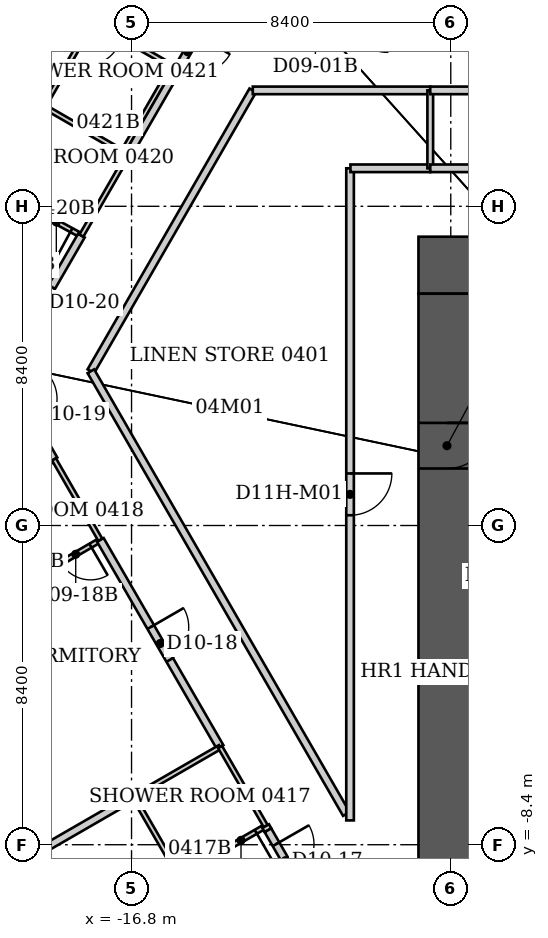
"""IFC4 building model, lengths in metres.
Left out: names, types, materials, properties, quantities, classifications, styles, units other than length and angle.
Written with IfcOpenShell. Run it as: python <this file> out.ifc"""

import sys

from ifc_helpers import new_model, si_unit, direction, frame, frame_2d, origin, place, context, subcontext, project, spatial, rectangle, extrude, element, fill, save


model = new_model("IFC4")
c1 = context("Model", 3, precision=1e-05, world=origin(), true_north=direction((0.0, 1.0)))
c2 = subcontext(c1, "Body", "Model", "MODEL_VIEW")
j1 = project(units=[si_unit("LENGTHUNIT", "METRE"), si_unit("PLANEANGLEUNIT", "RADIAN")], contexts=[c1])
p1 = place(None, origin())
s1 = spatial("IfcSite", under=j1, at=p1, CompositionType="ELEMENT")
p2 = place(p1, origin())
s2 = spatial("IfcBuilding", under=s1, at=p2, CompositionType="ELEMENT")
p3 = place(p2, frame((0.0, 0.0, 23.0)))
s3 = spatial("IfcBuildingStorey", under=s2, at=p3, CompositionType="ELEMENT", Elevation=23.0)
p4 = place(p3, frame((-9.25, 6.85, 0.0), z_axis=(0.0, 0.0, 1.0), x_axis=(1.0, 0.0, 0.0)))
e1 = element("IfcWall", 1, at=p4, inside=s3, PredefinedType="SHEAR", context=c2, shape_type="SweptSolid", body=[
    extrude(rectangle(XDim=18.5, YDim=1.5, at=frame_2d((9.25, 0.0))), origin(), (0.0, 0.0, 1.0), 3.8),
])
p5 = place(p3, frame((-8.5, -9.2, 0.0), z_axis=(0.0, 0.0, 1.0), x_axis=(0.0, 1.0, 0.0)))
e2 = element("IfcWall", 2, at=p5, inside=s3, PredefinedType="SHEAR", context=c2, shape_type="SweptSolid", body=[
    extrude(rectangle(XDim=15.3, YDim=1.5, at=frame_2d((7.65, 0.0))), origin(), (0.0, 0.0, 1.0), 3.8),
])
p6 = place(p5, frame((10.7, 0.0, 0.0)))
e3 = element("IfcOpeningElement", 3, at=p6, cuts=e2, PredefinedType="OPENING", context=c2, shape_type="SweptSolid", body=[
    extrude(rectangle(XDim=1.2, YDim=2.2, at=frame_2d((0.6, 1.1))), frame((0.0, 0.75, 0.0), z_axis=(0.0, -1.0, 0.0), x_axis=(1.0, 0.0, 0.0)), (0.0, 0.0, 1.0), 1.5),
])
p7 = place(p3, frame((-21.726, -10.02, 0.0), z_axis=(0.0, 0.0, 1.0), x_axis=(0.865919350456, 0.50018364478, 0.0)))
e4 = element("IfcWall", 4, at=p7, inside=s3, PredefinedType="PARTITIONING", context=c2, shape_type="SweptSolid", body=[
    extrude(rectangle(XDim=5.758, YDim=0.2, at=frame_2d((2.879, 0.0))), origin(), (0.0, 0.0, 1.0), 3.023),
])
p8 = place(p3, frame((-20.53, 0.77, 0.0), z_axis=(0.0, 0.0, 1.0), x_axis=(0.867293167797, 0.497797711016, 0.0)))
e5 = element("IfcWall", 5, at=p8, inside=s3, PredefinedType="PARTITIONING", context=c2, shape_type="SweptSolid", body=[
    extrude(rectangle(XDim=1.948, YDim=0.12, at=frame_2d((0.974, 0.0))), origin(), (0.0, 0.0, 1.0), 3.64),
])
p9 = place(p3, frame((-20.41, 8.87, 0.0), z_axis=(0.0, 0.0, 1.0), x_axis=(0.879324680711, -0.476222748189, 0.0)))
e6 = element("IfcWall", 6, at=p9, inside=s3, PredefinedType="PARTITIONING", context=c2, shape_type="SweptSolid", body=[
    extrude(rectangle(XDim=2.604, YDim=0.12, at=frame_2d((1.302, 0.0))), origin(), (0.0, 0.0, 1.0), 3.64),
])
p10 = place(p9, frame((1.404, 0.0, 0.0)))
e7 = element("IfcOpeningElement", 7, at=p10, cuts=e6, PredefinedType="OPENING", context=c2, shape_type="SweptSolid", body=[
    extrude(rectangle(XDim=0.9, YDim=2.03, at=frame_2d((0.45, 1.015))), frame((0.0, 0.06, 0.0), z_axis=(0.0, -1.0, 0.0), x_axis=(1.0, 0.0, 0.0)), (0.0, 0.0, 1.0), 0.12),
])
p11 = place(p3, frame((-20.18, 4.06, 0.0), z_axis=(0.0, 0.0, 1.0), x_axis=(0.500098439427, -0.865968562295, 0.0)))
e8 = element("IfcWall", 8, at=p11, inside=s3, PredefinedType="PARTITIONING", context=c2, shape_type="SweptSolid", body=[
    extrude(rectangle(XDim=2.679, YDim=0.2, at=frame_2d((1.34, 0.0))), origin(), (0.0, 0.0, 1.0), 3.64),
])
p12 = place(p11, frame((0.84, 0.0, 0.0)))
e9 = element("IfcOpeningElement", 9, at=p12, cuts=e8, PredefinedType="OPENING", context=c2, shape_type="SweptSolid", body=[
    extrude(rectangle(XDim=1.0, YDim=2.13, at=frame_2d((0.5, 1.065))), frame((0.0, 0.1, 0.0), z_axis=(0.0, -1.0, 0.0), x_axis=(1.0, 0.0, 0.0)), (0.0, 0.0, 1.0), 0.2),
])
p13 = place(p3, frame((-20.18, 4.06, 0.0), z_axis=(0.0, 0.0, 1.0), x_axis=(0.499891670567, 0.866087938779, 0.0)))
e10 = element("IfcWall", 10, at=p13, inside=s3, PredefinedType="PARTITIONING", context=c2, shape_type="SweptSolid", body=[
    extrude(rectangle(XDim=4.122, YDim=0.2, at=frame_2d((2.061, 0.0))), origin(), (0.0, 0.0, 1.0), 3.64),
])
p14 = place(p13, frame((1.561, 0.0, 0.0)))
e11 = element("IfcOpeningElement", 11, at=p14, cuts=e10, PredefinedType="OPENING", context=c2, shape_type="SweptSolid", body=[
    extrude(rectangle(XDim=1.0, YDim=2.13, at=frame_2d((0.5, 1.065))), frame((0.0, 0.1, 0.0), z_axis=(0.0, -1.0, 0.0), x_axis=(1.0, 0.0, 0.0)), (0.0, 0.0, 1.0), 0.2),
])
p15 = place(p3, frame((-19.93, -1.72, 0.0), z_axis=(0.0, 0.0, 1.0), x_axis=(0.865006586495, 0.501760505939, 0.0)))
e12 = element("IfcWall", 12, at=p15, inside=s3, PredefinedType="PARTITIONING", context=c2, shape_type="SweptSolid", body=[
    extrude(rectangle(XDim=2.67, YDim=0.12, at=frame_2d((1.335, 0.0))), origin(), (0.0, 0.0, 1.0), 2.878),
])
p16 = place(p15, frame((1.47, 0.0, 0.0)))
e13 = element("IfcOpeningElement", 13, at=p16, cuts=e12, PredefinedType="OPENING", context=c2, shape_type="SweptSolid", body=[
    extrude(rectangle(XDim=0.9, YDim=2.03, at=frame_2d((0.45, 1.015))), frame((0.0, 0.06, 0.0), z_axis=(0.0, -1.0, 0.0), x_axis=(1.0, 0.0, 0.0)), (0.0, 0.0, 1.0), 0.12),
])
p17 = place(p3, frame((-19.11, 11.03, 0.0), z_axis=(0.0, 0.0, 1.0), x_axis=(0.866202511239, -0.499693115345, 0.0)))
e14 = element("IfcWall", 14, at=p17, inside=s3, PredefinedType="PARTITIONING", context=c2, shape_type="SweptSolid", body=[
    extrude(rectangle(XDim=2.401, YDim=0.12, at=frame_2d((1.201, 0.0))), origin(), (0.0, 0.0, 1.0), 2.86),
])
p18 = place(p3, frame((-18.84, 1.74, 0.0), z_axis=(0.0, 0.0, 1.0), x_axis=(0.498791783817, -0.866721844883, 0.0)))
e15 = element("IfcWall", 15, at=p18, inside=s3, PredefinedType="PARTITIONING", context=c2, shape_type="SweptSolid", body=[
    extrude(rectangle(XDim=2.446, YDim=0.12, at=frame_2d((1.223, 0.0))), origin(), (0.0, 0.0, 1.0), 3.64),
])
p19 = place(p3, frame((-18.12, 7.63, 0.0), z_axis=(0.0, 0.0, 1.0), x_axis=(0.499957770222, 0.866049783786, 0.0)))
e16 = element("IfcWall", 16, at=p19, inside=s3, PredefinedType="PARTITIONING", context=c2, shape_type="SweptSolid", body=[
    extrude(rectangle(XDim=2.455, YDim=0.12, at=frame_2d((1.228, 0.0))), origin(), (0.0, 0.0, 1.0), 3.64),
])
p20 = place(p3, frame((-17.87, 4.06, 0.0), z_axis=(0.0, 0.0, 1.0), x_axis=(0.499424260127, 0.866357552282, 0.0)))
e17 = element("IfcWall", 17, at=p20, inside=s3, PredefinedType="PARTITIONING", context=c2, shape_type="SweptSolid", body=[
    extrude(rectangle(XDim=8.53, YDim=0.2, at=frame_2d((4.265, 0.0))), origin(), (0.0, 0.0, 1.0), 3.64),
])
p21 = place(p3, frame((-17.81, 13.28, 0.0), z_axis=(0.0, 0.0, 1.0), x_axis=(-0.500291685314, -0.865856933682, 0.0)))
e18 = element("IfcWall", 18, at=p21, inside=s3, PredefinedType="PARTITIONING", context=c2, shape_type="SweptSolid", body=[
    extrude(rectangle(XDim=2.599, YDim=0.12, at=frame_2d((1.299, 0.0))), origin(), (0.0, 0.0, 1.0), 3.64),
])
p22 = place(p21, frame((0.3, 0.0, 0.0)))
e19 = element("IfcOpeningElement", 19, at=p22, cuts=e18, PredefinedType="OPENING", context=c2, shape_type="SweptSolid", body=[
    extrude(rectangle(XDim=0.9, YDim=2.03, at=frame_2d((0.45, 1.015))), frame((0.0, 0.06, 0.0), z_axis=(0.0, -1.0, 0.0), x_axis=(1.0, 0.0, 0.0)), (0.0, 0.0, 1.0), 0.12),
])
p23 = place(p3, frame((-17.62, -0.38, 0.0), z_axis=(0.0, 0.0, 1.0), x_axis=(0.500413927211, -0.865786290867, 0.0)))
e20 = element("IfcWall", 20, at=p23, inside=s3, PredefinedType="PARTITIONING", context=c2, shape_type="SweptSolid", body=[
    extrude(rectangle(XDim=6.295, YDim=0.2, at=frame_2d((3.147, 0.0))), origin(), (0.0, 0.0, 1.0), 3.64),
])
p24 = place(p23, frame((2.647, 0.0, 0.0)))
e21 = element("IfcOpeningElement", 21, at=p24, cuts=e20, PredefinedType="OPENING", context=c2, shape_type="SweptSolid", body=[
    extrude(rectangle(XDim=1.0, YDim=2.13, at=frame_2d((0.5, 1.065))), frame((0.0, 0.1, 0.0), z_axis=(0.0, -1.0, 0.0), x_axis=(1.0, 0.0, 0.0)), (0.0, 0.0, 1.0), 0.2),
])
p25 = place(p3, frame((-17.03, 9.83, 0.0), z_axis=(0.0, 0.0, 1.0), x_axis=(0.880098986228, -0.47479024257, 0.0)))
e22 = element("IfcWall", 22, at=p25, inside=s3, PredefinedType="PARTITIONING", context=c2, shape_type="SweptSolid", body=[
    extrude(rectangle(XDim=0.147, YDim=0.12, at=frame_2d((0.074, 0.0))), origin(), (0.0, 0.0, 1.0), 3.64),
])
p26 = place(p3, frame((-17.03, 9.83, 0.0), z_axis=(0.0, 0.0, 1.0), x_axis=(0.500291685314, 0.865856933682, 0.0)))
e23 = element("IfcWall", 23, at=p26, inside=s3, PredefinedType="PARTITIONING", context=c2, shape_type="SweptSolid", body=[
    extrude(rectangle(XDim=2.599, YDim=0.12, at=frame_2d((1.299, 0.0))), origin(), (0.0, 0.0, 1.0), 3.64),
])
p27 = place(p3, frame((-16.892, 9.756, 0.0), z_axis=(0.0, 0.0, 1.0), x_axis=(0.499894213467, 0.866086471054, 0.0)))
e24 = element("IfcWall", 24, at=p27, inside=s3, PredefinedType="PARTITIONING", context=c2, shape_type="SweptSolid", body=[
    extrude(rectangle(XDim=4.266, YDim=0.2, at=frame_2d((2.133, 0.0))), origin(), (0.0, 0.0, 1.0), 3.64),
])
p28 = place(p27, frame((2.633, 0.0, 0.0)))
e25 = element("IfcOpeningElement", 25, at=p28, cuts=e24, PredefinedType="OPENING", context=c2, shape_type="SweptSolid", body=[
    extrude(rectangle(XDim=1.0, YDim=2.13, at=frame_2d((0.5, 1.065))), frame((0.0, 0.1, 0.0), z_axis=(0.0, -1.0, 0.0), x_axis=(1.0, 0.0, 0.0)), (0.0, 0.0, 1.0), 0.2),
])
p29 = place(p3, frame((-16.74, -7.14, 0.0), z_axis=(0.0, 0.0, 1.0), x_axis=(0.499693115345, -0.866202511239, 0.0)))
e26 = element("IfcWall", 26, at=p29, inside=s3, PredefinedType="PARTITIONING", context=c2, shape_type="SweptSolid", body=[
    extrude(rectangle(XDim=2.401, YDim=0.12, at=frame_2d((1.201, 0.0))), origin(), (0.0, 0.0, 1.0), 3.64),
])
p30 = place(p3, frame((-16.74, -7.14, 0.0), z_axis=(0.0, 0.0, 1.0), x_axis=(0.866154567199, 0.49977621564, 0.0)))
e27 = element("IfcWall", 27, at=p30, inside=s3, PredefinedType="PARTITIONING", context=c2, shape_type="SweptSolid", body=[
    extrude(rectangle(XDim=2.621, YDim=0.12, at=frame_2d((1.311, 0.0))), origin(), (0.0, 0.0, 1.0), 3.023),
])
p31 = place(p3, frame((-15.73, 12.08, 0.0), z_axis=(0.0, 0.0, 1.0), x_axis=(-0.866202511239, 0.499693115345, 0.0)))
e28 = element("IfcWall", 28, at=p31, inside=s3, PredefinedType="PARTITIONING", context=c2, shape_type="SweptSolid", body=[
    extrude(rectangle(XDim=2.401, YDim=0.12, at=frame_2d((1.201, 0.0))), origin(), (0.0, 0.0, 1.0), 3.64),
])
p32 = place(p3, frame((-15.54, -9.22, 0.0), z_axis=(0.0, 0.0, 1.0), x_axis=(0.866114241029, 0.499846097802, 0.0)))
e29 = element("IfcWall", 29, at=p32, inside=s3, PredefinedType="PARTITIONING", context=c2, shape_type="SweptSolid", body=[
    extrude(rectangle(XDim=2.621, YDim=0.12, at=frame_2d((1.311, 0.0))), origin(), (0.0, 0.0, 1.0), 3.64),
])
p33 = place(p32, frame((1.421, 0.0, 0.0)))
e30 = element("IfcOpeningElement", 30, at=p33, cuts=e29, PredefinedType="OPENING", context=c2, shape_type="SweptSolid", body=[
    extrude(rectangle(XDim=0.9, YDim=2.03, at=frame_2d((0.45, 1.015))), frame((0.0, 0.06, 0.0), z_axis=(0.0, -1.0, 0.0), x_axis=(1.0, 0.0, 0.0)), (0.0, 0.0, 1.0), 0.12),
])
p34 = place(p3, frame((-14.47, -5.83, 0.0), z_axis=(0.0, 0.0, 1.0), x_axis=(0.499737123639, -0.866177122335, 0.0)))
e31 = element("IfcWall", 31, at=p34, inside=s3, PredefinedType="PARTITIONING", context=c2, shape_type="SweptSolid", body=[
    extrude(rectangle(XDim=2.401, YDim=0.12, at=frame_2d((1.201, 0.0))), origin(), (0.0, 0.0, 1.0), 3.64),
])
p35 = place(p3, frame((-13.61, 11.45, 0.0), z_axis=(0.0, 0.0, 1.0), x_axis=(1.0, 0.0, 0.0)))
e32 = element("IfcWall", 32, at=p35, inside=s3, PredefinedType="PARTITIONING", context=c2, shape_type="SweptSolid", body=[
    extrude(rectangle(XDim=4.67, YDim=0.2, at=frame_2d((2.335, 0.0))), origin(), (0.0, 0.0, 1.0), 3.64),
])
p36 = place(p3, frame((-13.27, -7.91, 0.0), z_axis=(0.0, 0.0, 1.0), x_axis=(0.478852130681, -0.877895572914, 0.0)))
e33 = element("IfcWall", 33, at=p36, inside=s3, PredefinedType="PARTITIONING", context=c2, shape_type="SweptSolid", body=[
    extrude(rectangle(XDim=0.125, YDim=0.2, at=frame_2d((0.063, 0.0))), origin(), (0.0, 0.0, 1.0), 3.64),
])
p37 = place(p3, frame((-13.21, -8.02, 0.0), z_axis=(0.0, 0.0, 1.0), x_axis=(0.498473609767, -0.866904873885, 0.0)))
e34 = element("IfcWall", 34, at=p37, inside=s3, PredefinedType="PARTITIONING", context=c2, shape_type="SweptSolid", body=[
    extrude(rectangle(XDim=1.845, YDim=0.2, at=frame_2d((0.923, 0.0))), origin(), (0.0, 0.0, 1.0), 3.64),
])
p38 = place(p37, frame((0.423, 0.0, 0.0)))
e35 = element("IfcOpeningElement", 35, at=p38, cuts=e34, PredefinedType="OPENING", context=c2, shape_type="SweptSolid", body=[
    extrude(rectangle(XDim=1.0, YDim=2.13, at=frame_2d((0.5, 1.065))), frame((0.0, 0.1, 0.0), z_axis=(0.0, -1.0, 0.0), x_axis=(1.0, 0.0, 0.0)), (0.0, 0.0, 1.0), 0.2),
])
p39 = place(p3, frame((-11.147, -7.591, 0.0), z_axis=(0.0, 0.0, 1.0), x_axis=(-0.499756496688, 0.86616594485, 0.0)))
e36 = element("IfcWall", 36, at=p39, inside=s3, PredefinedType="PARTITIONING", context=c2, shape_type="SweptSolid", body=[
    extrude(rectangle(XDim=13.451, YDim=0.2, at=frame_2d((6.726, 0.0))), origin(), (0.0, 0.0, 1.0), 3.64),
])
p40 = place(p3, frame((-11.05, 9.4, 0.0), z_axis=(0.0, 0.0, 1.0), x_axis=(0.0, -1.0, 0.0)))
e37 = element("IfcWall", 37, at=p40, inside=s3, PredefinedType="PARTITIONING", context=c2, shape_type="SweptSolid", body=[
    extrude(rectangle(XDim=17.16, YDim=0.2, at=frame_2d((8.58, 0.0))), origin(), (0.0, 0.0, 1.0), 3.64),
])
p41 = place(p40, frame((8.03, 0.0, 0.0)))
e38 = element("IfcOpeningElement", 38, at=p41, cuts=e37, PredefinedType="OPENING", context=c2, shape_type="SweptSolid", body=[
    extrude(rectangle(XDim=1.1, YDim=2.2, at=frame_2d((0.55, 1.1))), frame((0.0, 0.1, 0.0), z_axis=(0.0, -1.0, 0.0), x_axis=(1.0, 0.0, 0.0)), (0.0, 0.0, 1.0), 0.2),
])
p42 = place(p3, frame((-8.94, 9.4, 0.0), z_axis=(0.0, 0.0, 1.0), x_axis=(-1.0, 0.0, 0.0)))
e39 = element("IfcWall", 39, at=p42, inside=s3, PredefinedType="PARTITIONING", context=c2, shape_type="SweptSolid", body=[
    extrude(rectangle(XDim=2.1, YDim=0.2, at=frame_2d((1.05, 0.0))), origin(), (0.0, 0.0, 1.0), 3.64),
])
p43 = place(p3, frame((-8.94, 11.45, 0.0), z_axis=(0.0, 0.0, 1.0), x_axis=(0.0, -1.0, 0.0)))
e40 = element("IfcWall", 40, at=p43, inside=s3, PredefinedType="PARTITIONING", context=c2, shape_type="SweptSolid", body=[
    extrude(rectangle(XDim=2.05, YDim=0.15, at=frame_2d((1.025, 0.0))), origin(), (0.0, 0.0, 1.0), 3.64),
])
p44 = place(p3, frame((-8.94, 11.45, 0.0), z_axis=(0.0, 0.0, 1.0), x_axis=(1.0, 0.0, 0.0)))
e41 = element("IfcWall", 41, at=p44, inside=s3, PredefinedType="PARTITIONING", context=c2, shape_type="SweptSolid", body=[
    extrude(rectangle(XDim=8.94, YDim=0.2, at=frame_2d((4.47, 0.0))), origin(), (0.0, 0.0, 1.0), 3.64),
])
p45 = place(p44, frame((3.92, 0.0, 0.0)))
e42 = element("IfcOpeningElement", 42, at=p45, cuts=e41, PredefinedType="OPENING", context=c2, shape_type="SweptSolid", body=[
    extrude(rectangle(XDim=1.1, YDim=2.2, at=frame_2d((0.55, 1.1))), frame((0.0, 0.1, 0.0), z_axis=(0.0, -1.0, 0.0), x_axis=(1.0, 0.0, 0.0)), (0.0, 0.0, 1.0), 0.2),
])
p46 = place(p3, frame((0.0, 9.4, 0.0), z_axis=(0.0, 0.0, 1.0), x_axis=(-1.0, 0.0, 0.0)))
e43 = element("IfcWall", 43, at=p46, inside=s3, PredefinedType="PARTITIONING", context=c2, shape_type="SweptSolid", body=[
    extrude(rectangle(XDim=8.94, YDim=0.2, at=frame_2d((4.47, 0.0))), origin(), (0.0, 0.0, 1.0), 3.64),
])
p47 = place(p38, origin())
e44 = element("IfcDoor", 44, at=p47, inside=s3, OperationType="SINGLE_SWING_LEFT", PredefinedType="DOOR", context=c2, shape_type="SweptSolid", body=[
    extrude(rectangle(XDim=1.0, YDim=2.13, at=frame_2d((0.5, 1.065))), frame((0.0, 0.025, 0.0), z_axis=(0.0, -1.0, 0.0), x_axis=(1.0, 0.0, 0.0)), (0.0, 0.0, 1.0), 0.05),
])
fill(e35, e44)
p48 = place(p33, origin())
e45 = element("IfcDoor", 45, at=p48, inside=s3, OperationType="SINGLE_SWING_RIGHT", PredefinedType="DOOR", context=c2, shape_type="SweptSolid", body=[
    extrude(rectangle(XDim=0.9, YDim=2.03, at=frame_2d((0.45, 1.015))), frame((0.0, 0.025, 0.0), z_axis=(0.0, -1.0, 0.0), x_axis=(1.0, 0.0, 0.0)), (0.0, 0.0, 1.0), 0.05),
])
fill(e30, e45)
p49 = place(p24, origin())
e46 = element("IfcDoor", 46, at=p49, inside=s3, OperationType="SINGLE_SWING_LEFT", PredefinedType="DOOR", context=c2, shape_type="SweptSolid", body=[
    extrude(rectangle(XDim=1.0, YDim=2.13, at=frame_2d((0.5, 1.065))), frame((0.0, 0.025, 0.0), z_axis=(0.0, -1.0, 0.0), x_axis=(1.0, 0.0, 0.0)), (0.0, 0.0, 1.0), 0.05),
])
fill(e21, e46)
p50 = place(p16, origin())
e47 = element("IfcDoor", 47, at=p50, inside=s3, OperationType="SINGLE_SWING_RIGHT", PredefinedType="DOOR", context=c2, shape_type="SweptSolid", body=[
    extrude(rectangle(XDim=0.9, YDim=2.03, at=frame_2d((0.45, 1.015))), frame((0.0, 0.025, 0.0), z_axis=(0.0, -1.0, 0.0), x_axis=(1.0, 0.0, 0.0)), (0.0, 0.0, 1.0), 0.05),
])
fill(e13, e47)
p51 = place(p10, origin())
e48 = element("IfcDoor", 48, at=p51, inside=s3, OperationType="SINGLE_SWING_RIGHT", PredefinedType="DOOR", context=c2, shape_type="SweptSolid", body=[
    extrude(rectangle(XDim=0.9, YDim=2.03, at=frame_2d((0.45, 1.015))), frame((0.0, 0.025, 0.0), z_axis=(0.0, -1.0, 0.0), x_axis=(1.0, 0.0, 0.0)), (0.0, 0.0, 1.0), 0.05),
])
fill(e7, e48)
p52 = place(p28, origin())
e49 = element("IfcDoor", 49, at=p52, inside=s3, OperationType="SINGLE_SWING_RIGHT", PredefinedType="DOOR", context=c2, shape_type="SweptSolid", body=[
    extrude(rectangle(XDim=1.0, YDim=2.13, at=frame_2d((0.5, 1.065))), frame((0.0, 0.025, 0.0), z_axis=(0.0, -1.0, 0.0), x_axis=(1.0, 0.0, 0.0)), (0.0, 0.0, 1.0), 0.05),
])
fill(e25, e49)
p53 = place(p22, origin())
e50 = element("IfcDoor", 50, at=p53, inside=s3, OperationType="SINGLE_SWING_LEFT", PredefinedType="DOOR", context=c2, shape_type="SweptSolid", body=[
    extrude(rectangle(XDim=0.9, YDim=2.03, at=frame_2d((0.45, 1.015))), frame((0.0, 0.025, 0.0), z_axis=(0.0, -1.0, 0.0), x_axis=(1.0, 0.0, 0.0)), (0.0, 0.0, 1.0), 0.05),
])
fill(e19, e50)
p54 = place(p41, origin())
e51 = element("IfcDoor", 51, at=p54, inside=s3, OperationType="SINGLE_SWING_LEFT", PredefinedType="DOOR", context=c2, shape_type="SweptSolid", body=[
    extrude(rectangle(XDim=1.1, YDim=2.2, at=frame_2d((0.55, 1.1))), frame((0.0, 0.025, 0.0), z_axis=(0.0, -1.0, 0.0), x_axis=(1.0, 0.0, 0.0)), (0.0, 0.0, 1.0), 0.05),
])
fill(e38, e51)
p55 = place(p6, origin())
e52 = element("IfcDoor", 52, at=p55, inside=s3, OperationType="SINGLE_SWING_RIGHT", PredefinedType="DOOR", context=c2, shape_type="SweptSolid", body=[
    extrude(rectangle(XDim=1.2, YDim=2.2, at=frame_2d((0.6, 1.1))), frame((0.0, 0.025, 0.0), z_axis=(0.0, -1.0, 0.0), x_axis=(1.0, 0.0, 0.0)), (0.0, 0.0, 1.0), 0.05),
])
fill(e3, e52)
save(model, sys.argv[1])
